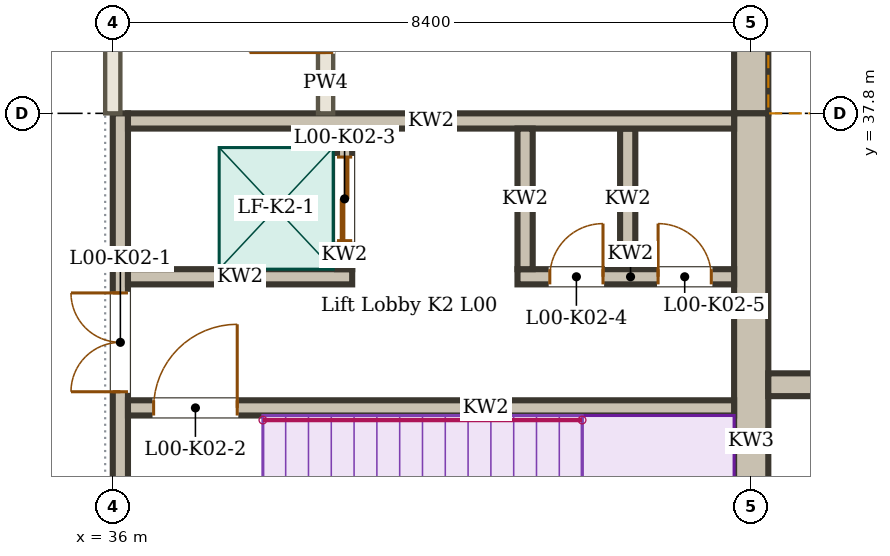
"""IFC4 building model, lengths in metres.
Left out: names, types, materials, properties, quantities, classifications, styles, units other than length and angle.
Written with IfcOpenShell. Run it as: python <this file> out.ifc"""

import sys

from ifc_helpers import new_model, si_unit, direction, frame, frame_2d, origin, place, context, subcontext, project, spatial, rectangle, extrude, element, fill, save


model = new_model("IFC4")
c1 = context("Model", 3, precision=1e-05, world=origin(), true_north=direction((0.0, 1.0)))
c2 = subcontext(c1, "Body", "Model", "MODEL_VIEW")
j1 = project(units=[si_unit("LENGTHUNIT", "METRE"), si_unit("PLANEANGLEUNIT", "RADIAN")], contexts=[c1])
p1 = place(None, origin())
s1 = spatial("IfcSite", under=j1, at=p1, CompositionType="ELEMENT")
p2 = place(p1, origin())
s2 = spatial("IfcBuilding", under=s1, at=p2, CompositionType="ELEMENT")
p3 = place(p2, origin())
s3 = spatial("IfcBuildingStorey", under=s2, at=p3, CompositionType="ELEMENT", Elevation=0.0)
p4 = place(p3, frame((44.625, 34.23, -0.45), z_axis=(0.0, 0.0, 1.0), x_axis=(1.0, 0.0, 0.0)))
e1 = element("IfcWall", 1, at=p4, inside=s3, PredefinedType="SOLIDWALL", context=c2, shape_type="SweptSolid", body=[
    extrude(rectangle(XDim=3.876, YDim=0.3, at=frame_2d((1.938, 0.0))), origin(), (0.0, 0.0, 1.0), 0.6),
])
p5 = place(p3, frame((44.4, 37.8, 0.0), z_axis=(0.0, 0.0, 1.0), x_axis=(0.0, 1.0, 0.0)))
e2 = element("IfcWall", 2, at=p5, inside=s3, PredefinedType="SOLIDWALL", context=c2, shape_type="SweptSolid", body=[
    extrude(rectangle(XDim=8.255, YDim=0.45, at=frame_2d((4.127, 0.0))), origin(), (0.0, 0.0, 1.0), 3.85),
])
p6 = place(p5, frame((1.1, 0.0, 2.1)))
e3 = element("IfcOpeningElement", 3, at=p6, cuts=e2, PredefinedType="OPENING", context=c2, shape_type="SweptSolid", body=[
    extrude(rectangle(XDim=0.6, YDim=1.2, at=frame_2d((0.3, 0.6))), frame((0.0, 0.235, 0.0), z_axis=(0.0, -1.0, 0.0), x_axis=(1.0, 0.0, 0.0)), (0.0, 0.0, 1.0), 0.47),
])
p7 = place(p5, frame((3.9, 0.0, 2.1)))
e4 = element("IfcOpeningElement", 4, at=p7, cuts=e2, PredefinedType="OPENING", context=c2, shape_type="SweptSolid", body=[
    extrude(rectangle(XDim=0.6, YDim=1.2, at=frame_2d((0.3, 0.6))), frame((0.0, 0.235, 0.0), z_axis=(0.0, -1.0, 0.0), x_axis=(1.0, 0.0, 0.0)), (0.0, 0.0, 1.0), 0.47),
])
p8 = place(p5, frame((6.7, 0.0, 2.1)))
e5 = element("IfcOpeningElement", 5, at=p8, cuts=e2, PredefinedType="OPENING", context=c2, shape_type="SweptSolid", body=[
    extrude(rectangle(XDim=0.6, YDim=1.2, at=frame_2d((0.3, 0.6))), frame((0.0, 0.235, 0.0), z_axis=(0.0, -1.0, 0.0), x_axis=(1.0, 0.0, 0.0)), (0.0, 0.0, 1.0), 0.47),
])
p9 = place(p3, frame((44.56, 37.8, 3.87), z_axis=(0.0, 0.0, 1.0), x_axis=(0.0, 1.0, 0.0)))
e6 = element("IfcWall", 6, at=p9, inside=s3, PredefinedType="SOLIDWALL", context=c2, shape_type="SweptSolid", body=[
    extrude(rectangle(XDim=8.255, YDim=0.13, at=frame_2d((4.127, 0.0))), origin(), (0.0, 0.0, 1.0), 0.63),
])
p10 = place(p3, frame((36.0, 37.8, 0.0), z_axis=(0.0, 0.0, 1.0), x_axis=(0.0, 1.0, 0.0)))
e7 = element("IfcWall", 7, at=p10, inside=s3, PredefinedType="PARTITIONING", context=c2, shape_type="SweptSolid", body=[
    extrude(rectangle(XDim=5.52, YDim=0.2, at=frame_2d((2.76, 0.0))), origin(), (0.0, 0.0, 1.0), 3.8),
])
p11 = place(p10, frame((2.3, 0.0, 0.0)))
e8 = element("IfcOpeningElement", 8, at=p11, cuts=e7, PredefinedType="OPENING", context=c2, shape_type="SweptSolid", body=[
    extrude(rectangle(XDim=1.0, YDim=2.1, at=frame_2d((0.5, 1.05))), frame((0.0, 0.11, 0.0), z_axis=(0.0, -1.0, 0.0), x_axis=(1.0, 0.0, 0.0)), (0.0, 0.0, 1.0), 0.22),
])
p12 = place(p3, frame((38.8, 37.8, 0.0), z_axis=(0.0, 0.0, 1.0), x_axis=(0.0, 1.0, 0.0)))
e9 = element("IfcWall", 9, at=p12, inside=s3, PredefinedType="PARTITIONING", context=c2, shape_type="SweptSolid", body=[
    extrude(rectangle(XDim=2.725, YDim=0.2, at=frame_2d((1.362, 0.0))), origin(), (0.0, 0.0, 1.0), 3.95),
])
p13 = place(p12, frame((0.8, 0.0, 0.0)))
e10 = element("IfcOpeningElement", 10, at=p13, cuts=e9, PredefinedType="OPENING", context=c2, shape_type="SweptSolid", body=[
    extrude(rectangle(XDim=1.0, YDim=2.1, at=frame_2d((0.5, 1.05))), frame((0.0, 0.11, 0.0), z_axis=(0.0, -1.0, 0.0), x_axis=(1.0, 0.0, 0.0)), (0.0, 0.0, 1.0), 0.22),
])
p14 = place(p3, frame((36.1, 29.625, 0.0), z_axis=(0.0, 0.0, 1.0), x_axis=(0.0, 1.0, 0.0)))
e11 = element("IfcWall", 11, at=p14, inside=s3, PredefinedType="SOLIDWALL", context=c2, shape_type="SweptSolid", body=[
    extrude(rectangle(XDim=8.175, YDim=0.2, at=frame_2d((4.087, 0.0))), origin(), (0.0, 0.0, 1.0), 4.5),
])
p15 = place(p14, frame((4.512, 0.0, 0.0)))
e12 = element("IfcOpeningElement", 12, at=p15, cuts=e11, PredefinedType="OPENING", context=c2, shape_type="SweptSolid", body=[
    extrude(rectangle(XDim=1.3, YDim=2.1, at=frame_2d((0.65, 1.05))), frame((0.0, 0.11, 0.0), z_axis=(0.0, -1.0, 0.0), x_axis=(1.0, 0.0, 0.0)), (0.0, 0.0, 1.0), 0.22),
])
p16 = place(p3, frame((44.4, 29.175, 0.0), z_axis=(0.0, 0.0, 1.0), x_axis=(0.0, 1.0, 0.0)))
e13 = element("IfcWall", 13, at=p16, inside=s3, PredefinedType="SOLIDWALL", context=c2, shape_type="SweptSolid", body=[
    extrude(rectangle(XDim=8.625, YDim=0.45, at=frame_2d((4.312, 0.0))), origin(), (0.0, 0.0, 1.0), 4.5),
])
p17 = place(p3, frame((36.2, 37.7, 0.0), z_axis=(0.0, 0.0, 1.0), x_axis=(1.0, 0.0, 0.0)))
e14 = element("IfcWall", 14, at=p17, inside=s3, PredefinedType="SOLIDWALL", context=c2, shape_type="SweptSolid", body=[
    extrude(rectangle(XDim=7.975, YDim=0.2, at=frame_2d((3.988, 0.0))), origin(), (0.0, 0.0, 1.0), 4.5),
])
p18 = place(p3, frame((36.2, 33.925, 0.0), z_axis=(0.0, 0.0, 1.0), x_axis=(1.0, 0.0, 0.0)))
e15 = element("IfcWall", 15, at=p18, inside=s3, PredefinedType="SOLIDWALL", context=c2, shape_type="SweptSolid", body=[
    extrude(rectangle(XDim=7.975, YDim=0.2, at=frame_2d((3.988, 0.0))), origin(), (0.0, 0.0, 1.0), 4.5),
])
p19 = place(p18, frame((0.337, 0.0, 0.0)))
e16 = element("IfcOpeningElement", 16, at=p19, cuts=e15, PredefinedType="OPENING", context=c2, shape_type="SweptSolid", body=[
    extrude(rectangle(XDim=1.1, YDim=2.1, at=frame_2d((0.55, 1.05))), frame((0.0, 0.11, 0.0), z_axis=(0.0, -1.0, 0.0), x_axis=(1.0, 0.0, 0.0)), (0.0, 0.0, 1.0), 0.22),
])
p20 = place(p3, frame((36.2, 35.65, 0.0), z_axis=(0.0, 0.0, 1.0), x_axis=(1.0, 0.0, 0.0)))
e17 = element("IfcWall", 17, at=p20, inside=s3, PredefinedType="SOLIDWALL", context=c2, shape_type="SweptSolid", body=[
    extrude(rectangle(XDim=2.95, YDim=0.2, at=frame_2d((1.475, 0.0))), origin(), (0.0, 0.0, 1.0), 4.5),
])
p21 = place(p3, frame((41.325, 35.65, 0.0), z_axis=(0.0, 0.0, 1.0), x_axis=(1.0, 0.0, 0.0)))
e18 = element("IfcWall", 18, at=p21, inside=s3, PredefinedType="SOLIDWALL", context=c2, shape_type="SweptSolid", body=[
    extrude(rectangle(XDim=2.85, YDim=0.2, at=frame_2d((1.425, 0.0))), origin(), (0.0, 0.0, 1.0), 4.35),
])
p22 = place(p21, frame((0.425, 0.0, 0.0)))
e19 = element("IfcOpeningElement", 19, at=p22, cuts=e18, PredefinedType="OPENING", context=c2, shape_type="SweptSolid", body=[
    extrude(rectangle(XDim=0.7, YDim=2.1, at=frame_2d((0.35, 1.05))), frame((0.0, 0.11, 0.0), z_axis=(0.0, -1.0, 0.0), x_axis=(1.0, 0.0, 0.0)), (0.0, 0.0, 1.0), 0.22),
])
p23 = place(p21, frame((1.85, 0.0, 0.0)))
e20 = element("IfcOpeningElement", 20, at=p23, cuts=e18, PredefinedType="OPENING", context=c2, shape_type="SweptSolid", body=[
    extrude(rectangle(XDim=0.7, YDim=2.1, at=frame_2d((0.35, 1.05))), frame((0.0, 0.11, 0.0), z_axis=(0.0, -1.0, 0.0), x_axis=(1.0, 0.0, 0.0)), (0.0, 0.0, 1.0), 0.22),
])
p24 = place(p3, frame((39.05, 35.75, 0.0), z_axis=(0.0, 0.0, 1.0), x_axis=(0.0, 1.0, 0.0)))
e21 = element("IfcWall", 21, at=p24, inside=s3, PredefinedType="SOLIDWALL", context=c2, shape_type="SweptSolid", body=[
    extrude(rectangle(XDim=1.85, YDim=0.2, at=frame_2d((0.925, 0.0))), origin(), (0.0, 0.0, 1.0), 4.5),
])
p25 = place(p24, frame((0.375, 0.0, 0.0)))
e22 = element("IfcOpeningElement", 22, at=p25, cuts=e21, PredefinedType="OPENING", context=c2, shape_type="SweptSolid", body=[
    extrude(rectangle(XDim=1.1, YDim=2.1, at=frame_2d((0.55, 1.05))), frame((0.0, 0.11, 0.0), z_axis=(0.0, -1.0, 0.0), x_axis=(1.0, 0.0, 0.0)), (0.0, 0.0, 1.0), 0.22),
])
for number, where, z_axis, x_axis in (
    (23, (41.425, 35.75, 0.0), (0.0, 0.0, 1.0), (0.0, 1.0, 0.0)),
    (24, (42.775, 35.75, 0.0), (0.0, 0.0, 1.0), (0.0, 1.0, 0.0)),
):
    element("IfcWall", number, at=place(p3, frame(where, z_axis=z_axis, x_axis=x_axis)), inside=s3, PredefinedType="SOLIDWALL", context=c2, shape_type="SweptSolid", body=[
        extrude(rectangle(XDim=1.85, YDim=0.2, at=frame_2d((0.925, 0.0))), origin(), (0.0, 0.0, 1.0), 4.35),
    ])
p26 = place(p15, origin())
e25 = element("IfcDoor", 25, at=p26, inside=s3, OperationType="DOUBLE_DOOR_DOUBLE_SWING", PredefinedType="DOOR", context=c2, shape_type="SweptSolid", body=[
    extrude(rectangle(XDim=1.3, YDim=2.1, at=frame_2d((0.65, 1.05))), frame((0.0, 0.025, 0.0), z_axis=(0.0, -1.0, 0.0), x_axis=(1.0, 0.0, 0.0)), (0.0, 0.0, 1.0), 0.05),
])
fill(e12, e25)
p27 = place(p19, origin())
e26 = element("IfcDoor", 26, at=p27, inside=s3, OperationType="SINGLE_SWING_RIGHT", PredefinedType="DOOR", context=c2, shape_type="SweptSolid", body=[
    extrude(rectangle(XDim=1.1, YDim=2.1, at=frame_2d((0.55, 1.05))), frame((0.0, 0.025, 0.0), z_axis=(0.0, -1.0, 0.0), x_axis=(1.0, 0.0, 0.0)), (0.0, 0.0, 1.0), 0.05),
])
fill(e16, e26)
p28 = place(p25, origin())
e27 = element("IfcDoor", 27, at=p28, inside=s3, OperationType="DOUBLE_DOOR_SLIDING", PredefinedType="DOOR", context=c2, shape_type="SweptSolid", body=[
    extrude(rectangle(XDim=1.1, YDim=2.1, at=frame_2d((0.55, 1.05))), frame((0.0, 0.025, 0.0), z_axis=(0.0, -1.0, 0.0), x_axis=(1.0, 0.0, 0.0)), (0.0, 0.0, 1.0), 0.05),
])
fill(e22, e27)
p29 = place(p22, origin())
e28 = element("IfcDoor", 28, at=p29, inside=s3, OperationType="SINGLE_SWING_RIGHT", PredefinedType="DOOR", context=c2, shape_type="SweptSolid", body=[
    extrude(rectangle(XDim=0.7, YDim=2.1, at=frame_2d((0.35, 1.05))), frame((0.0, 0.025, 0.0), z_axis=(0.0, -1.0, 0.0), x_axis=(1.0, 0.0, 0.0)), (0.0, 0.0, 1.0), 0.05),
])
fill(e19, e28)
p30 = place(p23, origin())
e29 = element("IfcDoor", 29, at=p30, inside=s3, OperationType="SINGLE_SWING_LEFT", PredefinedType="DOOR", context=c2, shape_type="SweptSolid", body=[
    extrude(rectangle(XDim=0.7, YDim=2.1, at=frame_2d((0.35, 1.05))), frame((0.0, 0.025, 0.0), z_axis=(0.0, -1.0, 0.0), x_axis=(1.0, 0.0, 0.0)), (0.0, 0.0, 1.0), 0.05),
])
fill(e20, e29)
save(model, sys.argv[1])
